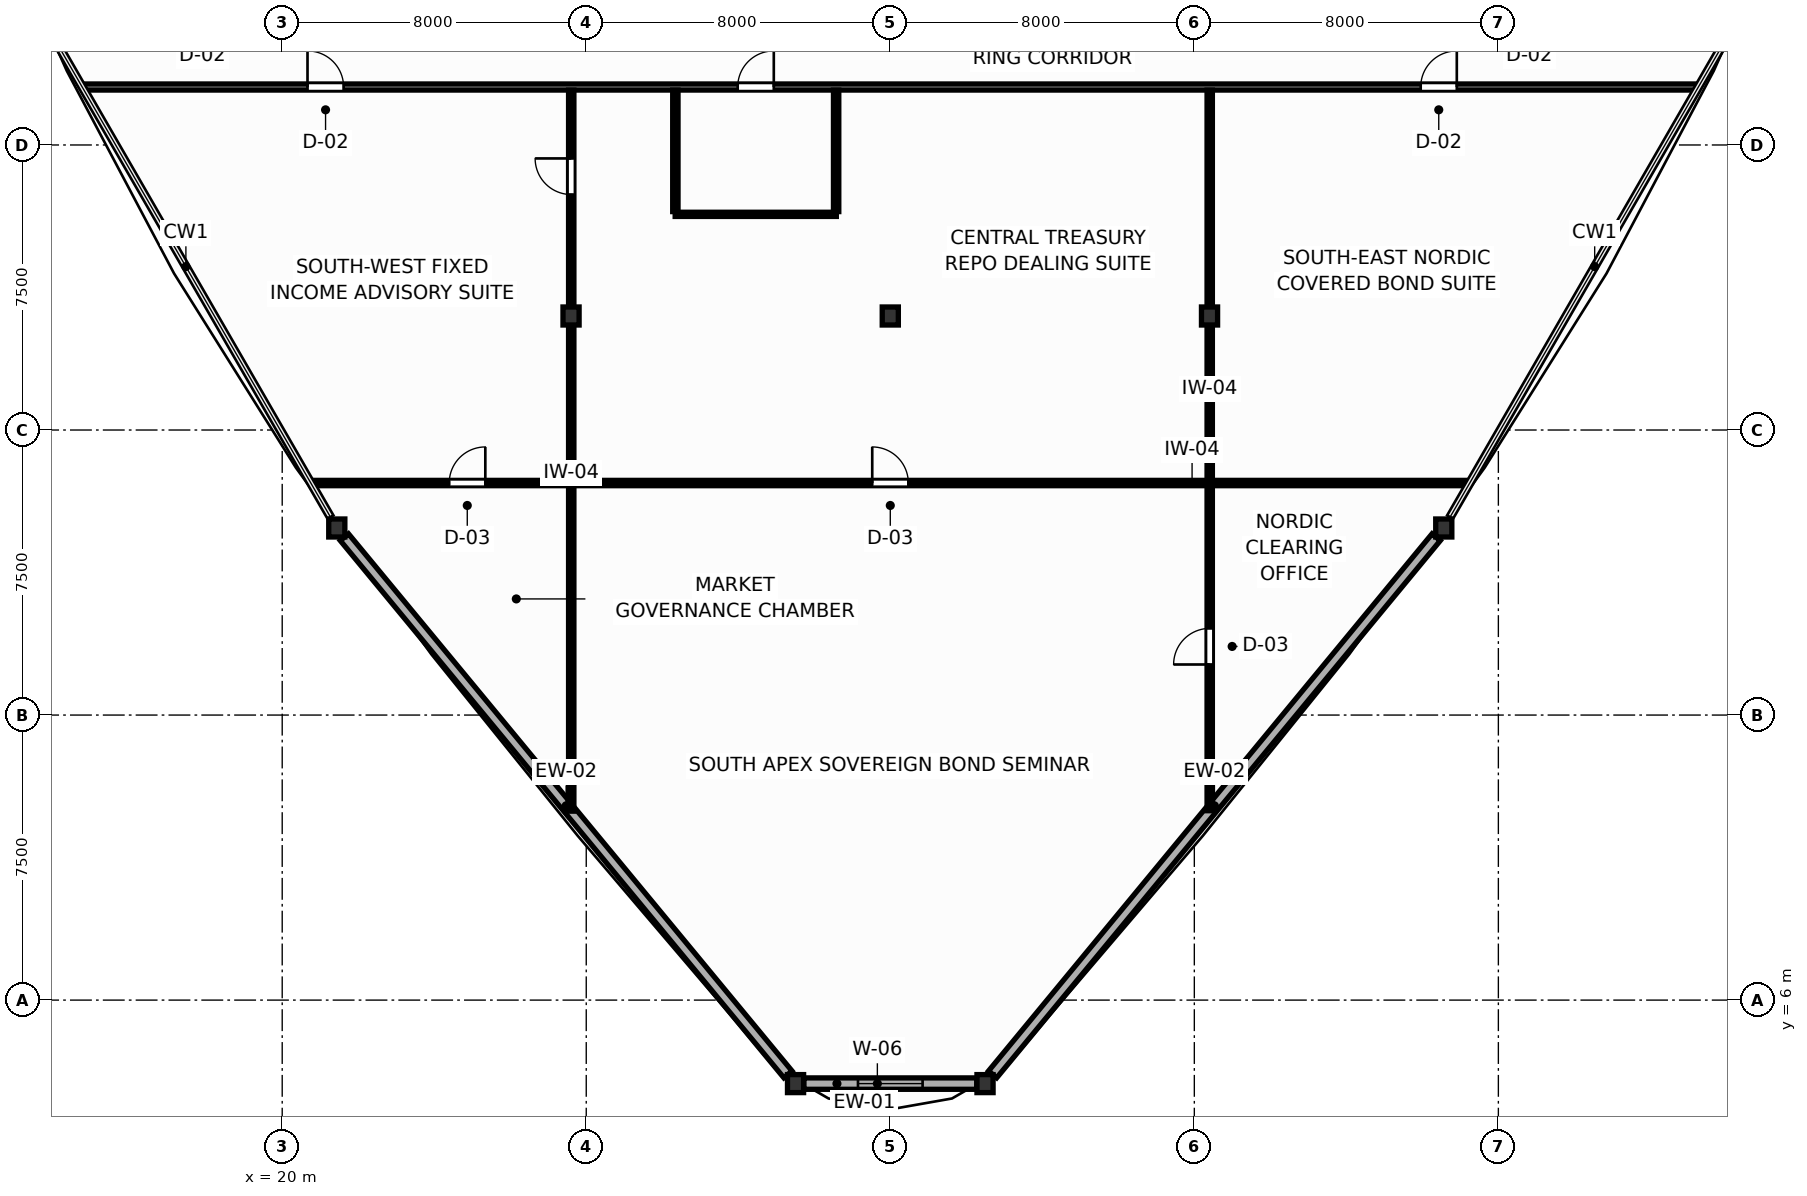
"""IFC4 building model, lengths in metres.
Left out: names, types, materials, properties, quantities, classifications, styles, units other than length and angle.
Written with IfcOpenShell. Run it as: python <this file> out.ifc"""

import sys

from ifc_helpers import new_model, si_unit, direction, frame, frame_2d, origin, origin_2d, place, context, subcontext, project, spatial, rectangle, i_section, extrude, source, transform, mapped, element, fill, save


model = new_model("IFC4")
c1 = context("Model", 3, precision=1e-05, world=origin(), true_north=direction((0.0, 1.0)))
c2 = subcontext(c1, "Body", "Model", "MODEL_VIEW")
j1 = project(units=[si_unit("LENGTHUNIT", "METRE"), si_unit("PLANEANGLEUNIT", "RADIAN")], contexts=[c1])
p1 = place(None, origin())
s1 = spatial("IfcSite", under=j1, at=p1, CompositionType="ELEMENT")
p2 = place(p1, origin())
s2 = spatial("IfcBuilding", under=s1, at=p2, CompositionType="ELEMENT")
p3 = place(p2, frame((0.0, 0.0, 35.7)))
s3 = spatial("IfcBuildingStorey", under=s2, at=p3, CompositionType="ELEMENT", Elevation=35.7)
m1 = source(origin(), c2, "Body", "SweptSolid", [
    extrude(i_section(OverallWidth=0.424, OverallDepth=0.474, WebThickness=0.045, FlangeThickness=0.072, FilletRadius=0.015, at=origin_2d()), origin(), (0.0, 0.0, 1.0), 3.9),
])
for number, where, z_axis, x_axis in (
    (1, (27.6, 24.0, 0.0), (0.0, 0.0, 1.0), (1.0, 0.0, 0.0)),
    (2, (44.4, 24.0, 0.0), (0.0, 0.0, 1.0), (1.0, 0.0, 0.0)),
    (3, (36.0, 24.0, 0.0), (0.0, 0.0, 1.0), (1.0, 0.0, 0.0)),
    (4, (21.436, 18.422, 0.0), (0.0, 0.0, 1.0), (1.0, 0.0, 0.0)),
    (5, (33.507, 3.803, 0.0), (0.0, 0.0, 1.0), (1.0, 0.0, 0.0)),
    (6, (38.493, 3.803, 0.0), (0.0, 0.0, 1.0), (1.0, 0.0, 0.0)),
    (7, (50.564, 18.422, 0.0), (0.0, 0.0, 1.0), (1.0, 0.0, 0.0)),
):
    element("IfcColumn", number, at=place(p3, frame(where, z_axis=z_axis, x_axis=x_axis)), inside=s3, PredefinedType="COLUMN", context=c2, shape_type="MappedRepresentation", body=[
        mapped(m1, transform((0.0, 0.0, 0.0), scale=1.0)),
    ])
p4 = place(p3, frame((21.636, 18.18, 0.0), z_axis=(0.0, 0.0, 1.0), x_axis=(0.636707615974, -0.771105318203, 0.0)))
e8 = element("IfcWall", 8, at=p4, inside=s3, PredefinedType="SOLIDWALL", context=c2, shape_type="SweptSolid", body=[
    extrude(rectangle(XDim=18.331, YDim=0.28, at=frame_2d((9.166, 0.0))), origin(), (0.0, 0.0, 1.0), 2.08),
])
p5 = place(p3, frame((33.724, 3.803, 0.0), z_axis=(0.0, 0.0, 1.0), x_axis=(1.0, 0.0, 0.0)))
e9 = element("IfcWall", 9, at=p5, inside=s3, PredefinedType="SOLIDWALL", context=c2, shape_type="SweptSolid", body=[
    extrude(rectangle(XDim=4.552, YDim=0.3, at=frame_2d((2.276, 0.0))), origin(), (0.0, 0.0, 1.0), 2.08),
])
p6 = place(p5, frame((1.426, 0.0, 0.75)))
e10 = element("IfcOpeningElement", 10, at=p6, cuts=e9, PredefinedType="OPENING", context=c2, shape_type="SweptSolid", body=[
    extrude(rectangle(XDim=1.7, YDim=1.15, at=frame_2d((0.85, 0.575))), frame((0.0, 0.16, 0.0), z_axis=(0.0, -1.0, 0.0), x_axis=(1.0, 0.0, 0.0)), (0.0, 0.0, 1.0), 0.32),
])
p7 = place(p3, frame((38.693, 4.045, 0.0), z_axis=(0.0, 0.0, 1.0), x_axis=(0.636707615974, 0.771105318203, 0.0)))
e11 = element("IfcWall", 11, at=p7, inside=s3, PredefinedType="SOLIDWALL", context=c2, shape_type="SweptSolid", body=[
    extrude(rectangle(XDim=18.331, YDim=0.28, at=frame_2d((9.166, 0.0))), origin(), (0.0, 0.0, 1.0), 2.08),
])
p8 = place(p3, frame((14.757, 30.025, 0.0), z_axis=(0.0, 0.0, 1.0), x_axis=(1.0, 0.0, 0.0)))
e12 = element("IfcWall", 12, at=p8, inside=s3, PredefinedType="PARTITIONING", context=c2, shape_type="SweptSolid", body=[
    extrude(rectangle(XDim=42.485, YDim=0.16, at=frame_2d((21.243, 0.0))), origin(), (0.0, 0.0, 1.0), 3.68),
])
p9 = place(p8, frame((17.228, 0.0, 0.0)))
e13 = element("IfcOpeningElement", 13, at=p9, cuts=e12, PredefinedType="OPENING", context=c2, shape_type="SweptSolid", body=[
    extrude(rectangle(XDim=0.95, YDim=2.05, at=frame_2d((0.475, 1.025))), frame((0.0, 0.09, 0.0), z_axis=(0.0, -1.0, 0.0), x_axis=(1.0, 0.0, 0.0)), (0.0, 0.0, 1.0), 0.18),
])
p10 = place(p8, frame((5.908, 0.0, 0.0)))
e14 = element("IfcOpeningElement", 14, at=p10, cuts=e12, PredefinedType="OPENING", context=c2, shape_type="SweptSolid", body=[
    extrude(rectangle(XDim=0.95, YDim=2.05, at=frame_2d((0.475, 1.025))), frame((0.0, 0.09, 0.0), z_axis=(0.0, -1.0, 0.0), x_axis=(1.0, 0.0, 0.0)), (0.0, 0.0, 1.0), 0.18),
])
p11 = place(p8, frame((35.199, 0.0, 0.0)))
e15 = element("IfcOpeningElement", 15, at=p11, cuts=e12, PredefinedType="OPENING", context=c2, shape_type="SweptSolid", body=[
    extrude(rectangle(XDim=0.95, YDim=2.05, at=frame_2d((0.475, 1.025))), frame((0.0, 0.09, 0.0), z_axis=(0.0, -1.0, 0.0), x_axis=(1.0, 0.0, 0.0)), (0.0, 0.0, 1.0), 0.18),
])
p12 = place(p3, frame((20.773, 19.605, 0.0), z_axis=(0.0, 0.0, 1.0), x_axis=(1.0, 0.0, 0.0)))
e16 = element("IfcWall", 16, at=p12, inside=s3, PredefinedType="PARTITIONING", context=c2, shape_type="SweptSolid", body=[
    extrude(rectangle(XDim=30.454, YDim=0.14, at=frame_2d((15.227, 0.0))), origin(), (0.0, 0.0, 1.0), 3.68),
])
p13 = place(p12, frame((3.621, 0.0, 0.0)))
e17 = element("IfcOpeningElement", 17, at=p13, cuts=e16, PredefinedType="OPENING", context=c2, shape_type="SweptSolid", body=[
    extrude(rectangle(XDim=0.95, YDim=2.05, at=frame_2d((0.475, 1.025))), frame((0.0, 0.08, 0.0), z_axis=(0.0, -1.0, 0.0), x_axis=(1.0, 0.0, 0.0)), (0.0, 0.0, 1.0), 0.16),
])
p14 = place(p12, frame((14.752, 0.0, 0.0)))
e18 = element("IfcOpeningElement", 18, at=p14, cuts=e16, PredefinedType="OPENING", context=c2, shape_type="SweptSolid", body=[
    extrude(rectangle(XDim=0.95, YDim=2.05, at=frame_2d((0.475, 1.025))), frame((0.0, 0.08, 0.0), z_axis=(0.0, -1.0, 0.0), x_axis=(1.0, 0.0, 0.0)), (0.0, 0.0, 1.0), 0.16),
])
p15 = place(p3, frame((27.605, 10.971, 0.0), z_axis=(0.0, 0.0, 1.0), x_axis=(0.0, 1.0, 0.0)))
e19 = element("IfcWall", 19, at=p15, inside=s3, PredefinedType="PARTITIONING", context=c2, shape_type="SweptSolid", body=[
    extrude(rectangle(XDim=18.972, YDim=0.14, at=frame_2d((9.486, 0.0))), origin(), (0.0, 0.0, 1.0), 2.24),
])
p16 = place(p15, frame((16.225, 0.0, 0.0)))
e20 = element("IfcOpeningElement", 20, at=p16, cuts=e19, PredefinedType="OPENING", context=c2, shape_type="SweptSolid", body=[
    extrude(rectangle(XDim=0.95, YDim=2.05, at=frame_2d((0.475, 1.025))), frame((0.0, 0.08, 0.0), z_axis=(0.0, -1.0, 0.0), x_axis=(1.0, 0.0, 0.0)), (0.0, 0.0, 1.0), 0.16),
])
p17 = place(p3, frame((44.405, 10.983, 0.0), z_axis=(0.0, 0.0, 1.0), x_axis=(0.0, 1.0, 0.0)))
e21 = element("IfcWall", 21, at=p17, inside=s3, PredefinedType="PARTITIONING", context=c2, shape_type="SweptSolid", body=[
    extrude(rectangle(XDim=18.96, YDim=0.14, at=frame_2d((9.48, 0.0))), origin(), (0.0, 0.0, 1.0), 2.24),
])
p18 = place(p17, frame((3.847, 0.0, 0.0)))
e22 = element("IfcOpeningElement", 22, at=p18, cuts=e21, PredefinedType="OPENING", context=c2, shape_type="SweptSolid", body=[
    extrude(rectangle(XDim=0.95, YDim=2.05, at=frame_2d((0.475, 1.025))), frame((0.0, 0.08, 0.0), z_axis=(0.0, -1.0, 0.0), x_axis=(1.0, 0.0, 0.0)), (0.0, 0.0, 1.0), 0.16),
])
p19 = place(p3, frame((30.34, 26.675, 0.0), z_axis=(0.0, 0.0, 1.0), x_axis=(1.0, 0.0, 0.0)))
e23 = element("IfcWall", 23, at=p19, inside=s3, PredefinedType="MOVABLE", context=c2, shape_type="SweptSolid", body=[
    extrude(rectangle(XDim=4.24, YDim=0.11, at=frame_2d((2.12, 0.0))), origin(), (0.0, 0.0, 1.0), 3.68),
])
for number, where, z_axis, x_axis in (
    (24, (34.575, 26.747, 0.0), (0.0, 0.0, 1.0), (0.0, 1.0, 0.0)),
    (25, (30.345, 26.747, 0.0), (0.0, 0.0, 1.0), (0.0, 1.0, 0.0)),
):
    element("IfcWall", number, at=place(p3, frame(where, z_axis=z_axis, x_axis=x_axis)), inside=s3, PredefinedType="PARTITIONING", context=c2, shape_type="SweptSolid", body=[
        extrude(rectangle(XDim=3.196, YDim=0.14, at=frame_2d((1.598, 0.0))), origin(), (0.0, 0.0, 1.0), 3.68),
    ])
p20 = place(p6, origin())
e26 = element("IfcWindow", 26, at=p20, inside=s3, PartitioningType="SINGLE_PANEL", PredefinedType="WINDOW", context=c2, shape_type="SweptSolid", body=[
    extrude(rectangle(XDim=1.7, YDim=1.15, at=frame_2d((0.85, 0.575))), frame((0.0, 0.03, 0.0), z_axis=(0.0, -1.0, 0.0), x_axis=(1.0, 0.0, 0.0)), (0.0, 0.0, 1.0), 0.06),
])
fill(e10, e26)
p21 = place(p9, origin())
e27 = element("IfcDoor", 27, at=p21, inside=s3, OperationType="SINGLE_SWING_RIGHT", PredefinedType="DOOR", context=c2, shape_type="SweptSolid", body=[
    extrude(rectangle(XDim=0.95, YDim=2.05, at=frame_2d((0.475, 1.025))), frame((0.0, 0.025, 0.0), z_axis=(0.0, -1.0, 0.0), x_axis=(1.0, 0.0, 0.0)), (0.0, 0.0, 1.0), 0.05),
])
fill(e13, e27)
p22 = place(p10, origin())
e28 = element("IfcDoor", 28, at=p22, inside=s3, OperationType="SINGLE_SWING_LEFT", PredefinedType="DOOR", context=c2, shape_type="SweptSolid", body=[
    extrude(rectangle(XDim=0.95, YDim=2.05, at=frame_2d((0.475, 1.025))), frame((0.0, 0.025, 0.0), z_axis=(0.0, -1.0, 0.0), x_axis=(1.0, 0.0, 0.0)), (0.0, 0.0, 1.0), 0.05),
])
fill(e14, e28)
p23 = place(p11, origin())
e29 = element("IfcDoor", 29, at=p23, inside=s3, OperationType="SINGLE_SWING_RIGHT", PredefinedType="DOOR", context=c2, shape_type="SweptSolid", body=[
    extrude(rectangle(XDim=0.95, YDim=2.05, at=frame_2d((0.475, 1.025))), frame((0.0, 0.025, 0.0), z_axis=(0.0, -1.0, 0.0), x_axis=(1.0, 0.0, 0.0)), (0.0, 0.0, 1.0), 0.05),
])
fill(e15, e29)
p24 = place(p13, origin())
e30 = element("IfcDoor", 30, at=p24, inside=s3, OperationType="SINGLE_SWING_RIGHT", PredefinedType="DOOR", context=c2, shape_type="SweptSolid", body=[
    extrude(rectangle(XDim=0.95, YDim=2.05, at=frame_2d((0.475, 1.025))), frame((0.0, 0.025, 0.0), z_axis=(0.0, -1.0, 0.0), x_axis=(1.0, 0.0, 0.0)), (0.0, 0.0, 1.0), 0.05),
])
fill(e17, e30)
p25 = place(p14, origin())
e31 = element("IfcDoor", 31, at=p25, inside=s3, OperationType="SINGLE_SWING_LEFT", PredefinedType="DOOR", context=c2, shape_type="SweptSolid", body=[
    extrude(rectangle(XDim=0.95, YDim=2.05, at=frame_2d((0.475, 1.025))), frame((0.0, 0.025, 0.0), z_axis=(0.0, -1.0, 0.0), x_axis=(1.0, 0.0, 0.0)), (0.0, 0.0, 1.0), 0.05),
])
fill(e18, e31)
p26 = place(p16, origin())
e32 = element("IfcDoor", 32, at=p26, inside=s3, OperationType="SINGLE_SWING_RIGHT", PredefinedType="DOOR", context=c2, shape_type="SweptSolid", body=[
    extrude(rectangle(XDim=0.95, YDim=2.05, at=frame_2d((0.475, 1.025))), frame((0.0, 0.025, 0.0), z_axis=(0.0, -1.0, 0.0), x_axis=(1.0, 0.0, 0.0)), (0.0, 0.0, 1.0), 0.05),
])
fill(e20, e32)
p27 = place(p18, origin())
e33 = element("IfcDoor", 33, at=p27, inside=s3, OperationType="SINGLE_SWING_LEFT", PredefinedType="DOOR", context=c2, shape_type="SweptSolid", body=[
    extrude(rectangle(XDim=0.95, YDim=2.05, at=frame_2d((0.475, 1.025))), frame((0.0, 0.025, 0.0), z_axis=(0.0, -1.0, 0.0), x_axis=(1.0, 0.0, 0.0)), (0.0, 0.0, 1.0), 0.05),
])
fill(e22, e33)
save(model, sys.argv[1])
